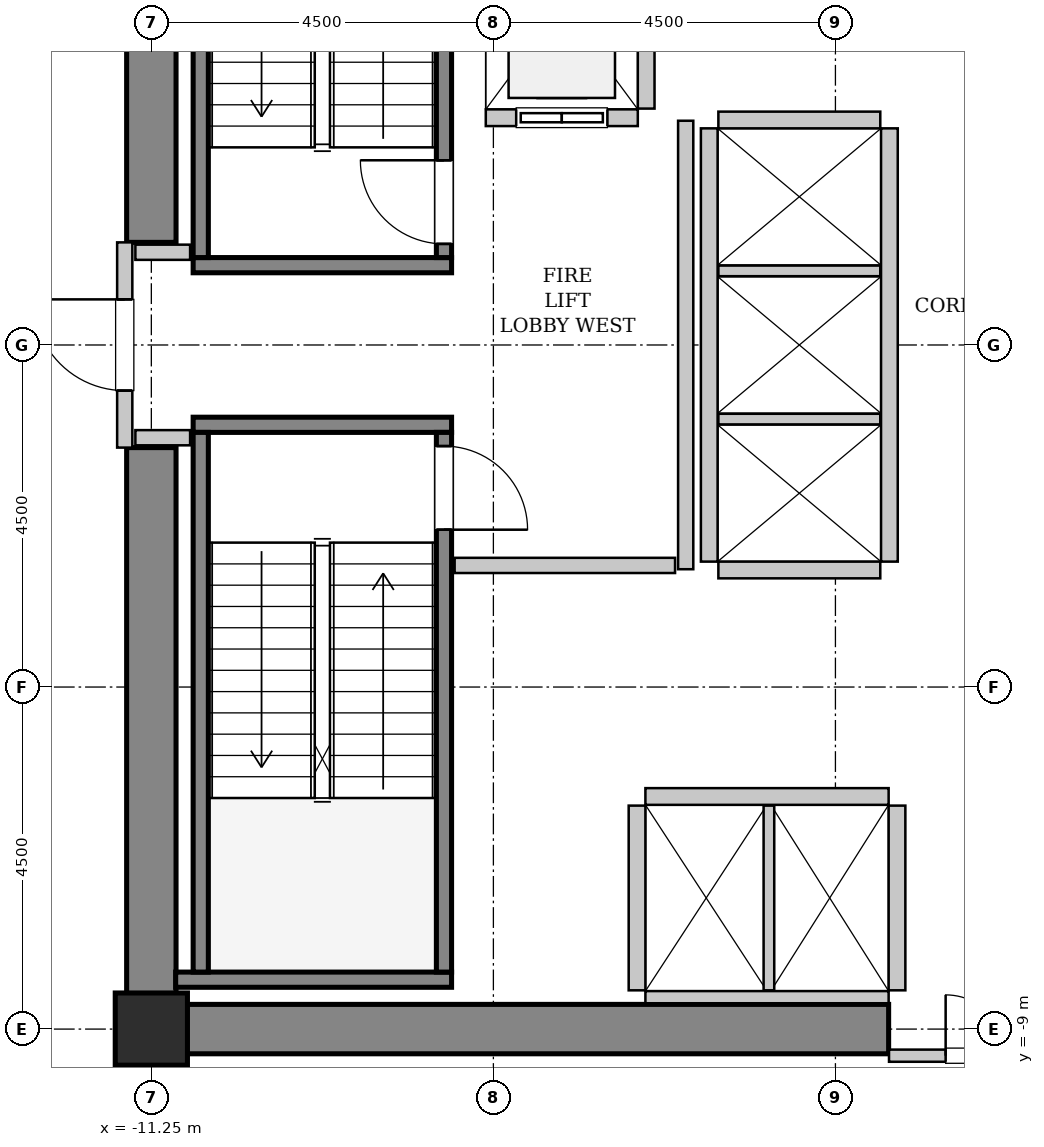
"""IFC4 building model, lengths in metres.
Left out: names, types, materials, properties, quantities, classifications, styles, units other than length and angle.
Written with IfcOpenShell. Run it as: python <this file> out.ifc"""

import sys

from ifc_helpers import new_model, si_unit, direction, frame, frame_2d, origin, origin_2d, place, context, subcontext, project, spatial, rectangle, hollow_rectangle, extrude, source, transform, mapped, element, fill, save


model = new_model("IFC4")
c1 = context("Model", 3, precision=1e-05, world=origin(), true_north=direction((0.0, 1.0)))
c2 = subcontext(c1, "Body", "Model", "MODEL_VIEW")
j1 = project(units=[si_unit("LENGTHUNIT", "METRE"), si_unit("PLANEANGLEUNIT", "RADIAN")], contexts=[c1])
p1 = place(None, origin())
s1 = spatial("IfcSite", under=j1, at=p1, CompositionType="ELEMENT")
p2 = place(p1, origin())
s2 = spatial("IfcBuilding", under=s1, at=p2, CompositionType="ELEMENT")
p3 = place(p2, frame((0.0, 0.0, 86.2)))
s3 = spatial("IfcBuildingStorey", under=s2, at=p3, CompositionType="ELEMENT", Elevation=86.2)
m1 = source(origin(), c2, "Body", "SweptSolid", [
    extrude(rectangle(XDim=10.025, YDim=0.65, at=frame_2d((5.012, 0.0))), origin(), (0.0, 0.0, 1.0), 4.6),
])
p4 = place(p3, frame((-11.575, -9.0, 0.0), z_axis=(0.0, 0.0, 1.0), x_axis=(1.0, 0.0, 0.0)))
e1 = element("IfcWall", 1, at=p4, inside=s3, PredefinedType="SHEAR", context=c2, shape_type="MappedRepresentation", body=[
    mapped(m1, transform((0.0, 0.0, 0.0), x_axis=(1.0, 0.0, 0.0), y_axis=(0.0, 1.0, 0.0), z_axis=(0.0, 0.0, 1.0), scale=1.0)),
])
m2 = source(origin(), c2, "Body", "SweptSolid", [
    extrude(rectangle(XDim=7.325, YDim=0.65, at=frame_2d((3.663, 0.0))), origin(), (0.0, 0.0, 1.0), 4.6),
])
for number, where, z_axis, x_axis in (
    (2, (-11.25, -8.675, 0.0), (0.0, 0.0, 1.0), (0.0, 1.0, 0.0)),
    (3, (-11.25, 1.35, 0.0), (0.0, 0.0, 1.0), (0.0, 1.0, 0.0)),
):
    element("IfcWall", number, at=place(p3, frame(where, z_axis=z_axis, x_axis=x_axis)), inside=s3, PredefinedType="SHEAR", context=c2, shape_type="MappedRepresentation", body=[
        mapped(m2, transform((0.0, 0.0, 0.0), x_axis=(1.0, 0.0, 0.0), y_axis=(0.0, 1.0, 0.0), z_axis=(0.0, 0.0, 1.0), scale=1.0)),
    ])
m3 = source(origin(), c2, "Body", "SweptSolid", [
    extrude(hollow_rectangle(XDim=0.95, YDim=0.95, WallThickness=0.045, InnerFilletRadius=0.045, OuterFilletRadius=0.09, at=origin_2d()), origin(), (0.0, 0.0, 1.0), 4.6),
])
p5 = place(p3, frame((-11.25, -9.0, 0.0), z_axis=(0.0, 0.0, 1.0), x_axis=(1.0, 0.0, 0.0)))
e4 = element("IfcColumn", 4, at=p5, inside=s3, PredefinedType="COLUMN", context=c2, shape_type="MappedRepresentation", body=[
    mapped(m3, transform((0.0, 0.0, 0.0), x_axis=(1.0, 0.0, 0.0), y_axis=(0.0, 1.0, 0.0), z_axis=(0.0, 0.0, 1.0), scale=1.0)),
])
m4 = source(origin(), c2, "Body", "SweptSolid", [
    extrude(rectangle(XDim=3.4, YDim=0.2, at=frame_2d((1.7, 0.0))), origin(), (0.0, 0.0, 1.0), 4.6),
])
p6 = place(p3, frame((-7.3, 1.05, 0.0), z_axis=(0.0, 0.0, 1.0), x_axis=(-1.0, 0.0, 0.0)))
e5 = element("IfcWall", 5, at=p6, inside=s3, PredefinedType="SOLIDWALL", context=c2, shape_type="MappedRepresentation", body=[
    mapped(m4, transform((0.0, 0.0, 0.0), x_axis=(1.0, 0.0, 0.0), y_axis=(0.0, 1.0, 0.0), z_axis=(0.0, 0.0, 1.0), scale=1.0)),
])
m5 = source(origin(), c2, "Body", "SweptSolid", [
    extrude(rectangle(XDim=7.1, YDim=0.2, at=frame_2d((3.55, 0.0))), origin(), (0.0, 0.0, 1.0), 4.6),
])
p7 = place(p3, frame((-7.4, 1.15, 0.0), z_axis=(0.0, 0.0, 1.0), x_axis=(0.0, 1.0, 0.0)))
e6 = element("IfcWall", 6, at=p7, inside=s3, PredefinedType="SOLIDWALL", context=c2, shape_type="MappedRepresentation", body=[
    mapped(m5, transform((0.0, 0.0, 0.0), x_axis=(1.0, 0.0, 0.0), y_axis=(0.0, 1.0, 0.0), z_axis=(0.0, 0.0, 1.0), scale=1.0)),
])
p8 = place(p7, frame((0.18, 0.0, 0.0)))
e7 = element("IfcOpeningElement", 7, at=p8, cuts=e6, PredefinedType="OPENING", context=c2, shape_type="SweptSolid", body=[
    extrude(rectangle(XDim=1.1, YDim=2.15, at=frame_2d((0.55, 1.075))), frame((0.0, 0.11, 0.0), z_axis=(0.0, -1.0, 0.0), x_axis=(1.0, 0.0, 0.0)), (0.0, 0.0, 1.0), 0.22),
])
p9 = place(p3, frame((-10.6, 1.15, 0.0), z_axis=(0.0, 0.0, 1.0), x_axis=(0.0, 1.0, 0.0)))
e8 = element("IfcWall", 8, at=p9, inside=s3, PredefinedType="SOLIDWALL", context=c2, shape_type="MappedRepresentation", body=[
    mapped(m5, transform((0.0, 0.0, 0.0), x_axis=(1.0, 0.0, 0.0), y_axis=(0.0, 1.0, 0.0), z_axis=(0.0, 0.0, 1.0), scale=1.0)),
])
p10 = place(p3, frame((-10.7, -1.05, 0.0), z_axis=(0.0, 0.0, 1.0), x_axis=(1.0, 0.0, 0.0)))
e9 = element("IfcWall", 9, at=p10, inside=s3, PredefinedType="SOLIDWALL", context=c2, shape_type="MappedRepresentation", body=[
    mapped(m4, transform((0.0, 0.0, 0.0), x_axis=(1.0, 0.0, 0.0), y_axis=(0.0, 1.0, 0.0), z_axis=(0.0, 0.0, 1.0), scale=1.0)),
])
m6 = source(origin(), c2, "Body", "SweptSolid", [
    extrude(rectangle(XDim=3.63, YDim=0.2, at=frame_2d((1.815, 0.0))), origin(), (0.0, 0.0, 1.0), 4.6),
])
p11 = place(p3, frame((-10.93, -8.35, 0.0), z_axis=(0.0, 0.0, 1.0), x_axis=(1.0, 0.0, 0.0)))
e10 = element("IfcWall", 10, at=p11, inside=s3, PredefinedType="SOLIDWALL", context=c2, shape_type="MappedRepresentation", body=[
    mapped(m6, transform((0.0, 0.0, 0.0), x_axis=(1.0, 0.0, 0.0), y_axis=(0.0, 1.0, 0.0), z_axis=(0.0, 0.0, 1.0), scale=1.0)),
])
p12 = place(p3, frame((-10.6, -1.15, 0.0), z_axis=(0.0, 0.0, 1.0), x_axis=(0.0, -1.0, 0.0)))
e11 = element("IfcWall", 11, at=p12, inside=s3, PredefinedType="SOLIDWALL", context=c2, shape_type="MappedRepresentation", body=[
    mapped(m5, transform((0.0, 0.0, 0.0), x_axis=(1.0, 0.0, 0.0), y_axis=(0.0, 1.0, 0.0), z_axis=(0.0, 0.0, 1.0), scale=1.0)),
])
p13 = place(p3, frame((-7.4, -1.15, 0.0), z_axis=(0.0, 0.0, 1.0), x_axis=(0.0, -1.0, 0.0)))
e12 = element("IfcWall", 12, at=p13, inside=s3, PredefinedType="SOLIDWALL", context=c2, shape_type="MappedRepresentation", body=[
    mapped(m5, transform((0.0, 0.0, 0.0), x_axis=(1.0, 0.0, 0.0), y_axis=(0.0, 1.0, 0.0), z_axis=(0.0, 0.0, 1.0), scale=1.0)),
])
p14 = place(p13, frame((0.18, 0.0, 0.0)))
e13 = element("IfcOpeningElement", 13, at=p14, cuts=e12, PredefinedType="OPENING", context=c2, shape_type="SweptSolid", body=[
    extrude(rectangle(XDim=1.1, YDim=2.15, at=frame_2d((0.55, 1.075))), frame((0.0, 0.11, 0.0), z_axis=(0.0, -1.0, 0.0), x_axis=(1.0, 0.0, 0.0)), (0.0, 0.0, 1.0), 0.22),
])
m7 = source(origin(), c2, "Body", "SweptSolid", [
    extrude(rectangle(XDim=2.0, YDim=0.22, at=frame_2d((1.0, 0.0))), origin(), (0.0, 0.0, 1.0), 4.335),
])
p15 = place(p3, frame((-6.85, 2.99, 0.0), z_axis=(0.0, 0.0, 1.0), x_axis=(1.0, 0.0, 0.0)))
e14 = element("IfcWall", 14, at=p15, inside=s3, PredefinedType="SOLIDWALL", context=c2, shape_type="MappedRepresentation", body=[
    mapped(m7, transform((0.0, 0.0, 0.0), x_axis=(1.0, 0.0, 0.0), y_axis=(0.0, 1.0, 0.0), z_axis=(0.0, 0.0, 1.0), scale=1.0)),
])
p16 = place(p15, frame((0.4, 0.0, 0.0)))
e15 = element("IfcOpeningElement", 15, at=p16, cuts=e14, PredefinedType="OPENING", context=c2, shape_type="SweptSolid", body=[
    extrude(rectangle(XDim=1.2, YDim=2.2, at=frame_2d((0.6, 1.1))), frame((0.0, 0.12, 0.0), z_axis=(0.0, -1.0, 0.0), x_axis=(1.0, 0.0, 0.0)), (0.0, 0.0, 1.0), 0.24),
])
m8 = source(origin(), c2, "Body", "SweptSolid", [
    extrude(rectangle(XDim=2.68, YDim=0.22, at=frame_2d((1.34, 0.0))), origin(), (0.0, 0.0, 1.0), 4.335),
])
p17 = place(p3, frame((-4.74, 3.11, 0.0), z_axis=(0.0, 0.0, 1.0), x_axis=(0.0, 1.0, 0.0)))
e16 = element("IfcWall", 16, at=p17, inside=s3, PredefinedType="SOLIDWALL", context=c2, shape_type="MappedRepresentation", body=[
    mapped(m8, transform((0.0, 0.0, 0.0), x_axis=(1.0, 0.0, 0.0), y_axis=(0.0, 1.0, 0.0), z_axis=(0.0, 0.0, 1.0), scale=1.0)),
])
m9 = source(origin(), c2, "Body", "SweptSolid", [
    extrude(rectangle(XDim=3.2, YDim=0.22, at=frame_2d((1.6, 0.0))), origin(), (0.0, 0.0, 1.0), 4.335),
])
p18 = place(p3, frame((-1.55, -5.94, 0.0), z_axis=(0.0, 0.0, 1.0), x_axis=(-1.0, 0.0, 0.0)))
e17 = element("IfcWall", 17, at=p18, inside=s3, PredefinedType="SOLIDWALL", context=c2, shape_type="MappedRepresentation", body=[
    mapped(m9, transform((0.0, 0.0, 0.0), x_axis=(1.0, 0.0, 0.0), y_axis=(0.0, 1.0, 0.0), z_axis=(0.0, 0.0, 1.0), scale=1.0)),
])
m10 = source(origin(), c2, "Body", "SweptSolid", [
    extrude(rectangle(XDim=3.2, YDim=0.16, at=frame_2d((1.6, 0.0))), origin(), (0.0, 0.0, 1.0), 3.225),
])
p19 = place(p3, frame((-4.75, -8.58, 0.0), z_axis=(0.0, 0.0, 1.0), x_axis=(1.0, 0.0, 0.0)))
e18 = element("IfcWall", 18, at=p19, inside=s3, PredefinedType="PARTITIONING", context=c2, shape_type="MappedRepresentation", body=[
    mapped(m10, transform((0.0, 0.0, 0.0), x_axis=(1.0, 0.0, 0.0), y_axis=(0.0, 1.0, 0.0), z_axis=(0.0, 0.0, 1.0), scale=1.0)),
])
m11 = source(origin(), c2, "Body", "SweptSolid", [
    extrude(rectangle(XDim=2.43, YDim=0.22, at=frame_2d((1.215, 0.0))), origin(), (0.0, 0.0, 1.0), 4.335),
])
p20 = place(p3, frame((-4.86, -6.06, 0.0), z_axis=(0.0, 0.0, 1.0), x_axis=(0.0, -1.0, 0.0)))
e19 = element("IfcWall", 19, at=p20, inside=s3, PredefinedType="SOLIDWALL", context=c2, shape_type="MappedRepresentation", body=[
    mapped(m11, transform((0.0, 0.0, 0.0), x_axis=(1.0, 0.0, 0.0), y_axis=(0.0, 1.0, 0.0), z_axis=(0.0, 0.0, 1.0), scale=1.0)),
])
m12 = source(origin(), c2, "Body", "SweptSolid", [
    extrude(rectangle(XDim=2.43, YDim=0.14, at=frame_2d((1.215, 0.0))), origin(), (0.0, 0.0, 1.0), 4.335),
])
p21 = place(p3, frame((-3.125, -8.49, 0.0), z_axis=(0.0, 0.0, 1.0), x_axis=(0.0, 1.0, 0.0)))
e20 = element("IfcWall", 20, at=p21, inside=s3, PredefinedType="PARTITIONING", context=c2, shape_type="MappedRepresentation", body=[
    mapped(m12, transform((0.0, 0.0, 0.0), x_axis=(1.0, 0.0, 0.0), y_axis=(0.0, 1.0, 0.0), z_axis=(0.0, 0.0, 1.0), scale=1.0)),
])
p22 = place(p3, frame((-1.44, -8.49, 0.0), z_axis=(0.0, 0.0, 1.0), x_axis=(0.0, 1.0, 0.0)))
e21 = element("IfcWall", 21, at=p22, inside=s3, PredefinedType="SOLIDWALL", context=c2, shape_type="MappedRepresentation", body=[
    mapped(m11, transform((0.0, 0.0, 0.0), x_axis=(1.0, 0.0, 0.0), y_axis=(0.0, 1.0, 0.0), z_axis=(0.0, 0.0, 1.0), scale=1.0)),
])
m13 = source(origin(), c2, "Body", "SweptSolid", [
    extrude(rectangle(XDim=5.7, YDim=0.22, at=frame_2d((2.85, 0.0))), origin(), (0.0, 0.0, 1.0), 4.335),
])
for number, where, z_axis, x_axis in (
    (22, (-1.54, -2.85, 0.0), (0.0, 0.0, 1.0), (0.0, 1.0, 0.0)),
    (23, (-3.91, 2.85, 0.0), (0.0, 0.0, 1.0), (0.0, -1.0, 0.0)),
):
    element("IfcWall", number, at=place(p3, frame(where, z_axis=z_axis, x_axis=x_axis)), inside=s3, PredefinedType="SOLIDWALL", context=c2, shape_type="MappedRepresentation", body=[
        mapped(m13, transform((0.0, 0.0, 0.0), x_axis=(1.0, 0.0, 0.0), y_axis=(0.0, 1.0, 0.0), z_axis=(0.0, 0.0, 1.0), scale=1.0)),
    ])
m14 = source(origin(), c2, "Body", "SweptSolid", [
    extrude(rectangle(XDim=2.13, YDim=0.22, at=frame_2d((1.065, 0.0))), origin(), (0.0, 0.0, 1.0), 4.335),
])
p23 = place(p3, frame((-3.79, -2.96, 0.0), z_axis=(0.0, 0.0, 1.0), x_axis=(1.0, 0.0, 0.0)))
e24 = element("IfcWall", 24, at=p23, inside=s3, PredefinedType="SOLIDWALL", context=c2, shape_type="MappedRepresentation", body=[
    mapped(m14, transform((0.0, 0.0, 0.0), x_axis=(1.0, 0.0, 0.0), y_axis=(0.0, 1.0, 0.0), z_axis=(0.0, 0.0, 1.0), scale=1.0)),
])
m15 = source(origin(), c2, "Body", "SweptSolid", [
    extrude(rectangle(XDim=2.13, YDim=0.14, at=frame_2d((1.065, 0.0))), origin(), (0.0, 0.0, 1.0), 4.335),
])
for number, where, z_axis, x_axis in (
    (25, (-3.79, -0.975, 0.0), (0.0, 0.0, 1.0), (1.0, 0.0, 0.0)),
    (26, (-3.79, 0.975, 0.0), (0.0, 0.0, 1.0), (1.0, 0.0, 0.0)),
):
    element("IfcWall", number, at=place(p3, frame(where, z_axis=z_axis, x_axis=x_axis)), inside=s3, PredefinedType="PARTITIONING", context=c2, shape_type="MappedRepresentation", body=[
        mapped(m15, transform((0.0, 0.0, 0.0), x_axis=(1.0, 0.0, 0.0), y_axis=(0.0, 1.0, 0.0), z_axis=(0.0, 0.0, 1.0), scale=1.0)),
    ])
p24 = place(p3, frame((-1.66, 2.96, 0.0), z_axis=(0.0, 0.0, 1.0), x_axis=(-1.0, 0.0, 0.0)))
e27 = element("IfcWall", 27, at=p24, inside=s3, PredefinedType="SOLIDWALL", context=c2, shape_type="MappedRepresentation", body=[
    mapped(m14, transform((0.0, 0.0, 0.0), x_axis=(1.0, 0.0, 0.0), y_axis=(0.0, 1.0, 0.0), z_axis=(0.0, 0.0, 1.0), scale=1.0)),
])
m16 = source(origin(), c2, "Body", "SweptSolid", [
    extrude(rectangle(XDim=2.7, YDim=0.2, at=frame_2d((1.35, 0.0))), origin(), (0.0, 0.0, 1.0), 3.225),
])
p25 = place(p3, frame((-11.6, -1.35, 0.0), z_axis=(0.0, 0.0, 1.0), x_axis=(0.0, 1.0, 0.0)))
e28 = element("IfcWall", 28, at=p25, inside=s3, PredefinedType="PARTITIONING", context=c2, shape_type="MappedRepresentation", body=[
    mapped(m16, transform((0.0, 0.0, 0.0), x_axis=(1.0, 0.0, 0.0), y_axis=(0.0, 1.0, 0.0), z_axis=(0.0, 0.0, 1.0), scale=1.0)),
])
p26 = place(p25, frame((0.75, 0.0, 0.0)))
e29 = element("IfcOpeningElement", 29, at=p26, cuts=e28, PredefinedType="OPENING", context=c2, shape_type="SweptSolid", body=[
    extrude(rectangle(XDim=1.2, YDim=2.15, at=frame_2d((0.6, 1.075))), frame((0.0, 0.11, 0.0), z_axis=(0.0, -1.0, 0.0), x_axis=(1.0, 0.0, 0.0)), (0.0, 0.0, 1.0), 0.22),
])
m17 = source(origin(), c2, "Body", "SweptSolid", [
    extrude(rectangle(XDim=5.9, YDim=0.2, at=frame_2d((2.95, 0.0))), origin(), (0.0, 0.0, 1.0), 4.335),
])
p27 = place(p3, frame((-4.22, -2.95, 0.0), z_axis=(0.0, 0.0, 1.0), x_axis=(0.0, 1.0, 0.0)))
e30 = element("IfcWall", 30, at=p27, inside=s3, PredefinedType="PARTITIONING", context=c2, shape_type="MappedRepresentation", body=[
    mapped(m17, transform((0.0, 0.0, 0.0), x_axis=(1.0, 0.0, 0.0), y_axis=(0.0, 1.0, 0.0), z_axis=(0.0, 0.0, 1.0), scale=1.0)),
])
m18 = source(origin(), c2, "Body", "SweptSolid", [
    extrude(rectangle(XDim=2.9, YDim=0.2, at=frame_2d((1.45, 0.0))), origin(), (0.0, 0.0, 1.0), 4.335),
])
p28 = place(p3, frame((-7.26, -2.9, 0.0), z_axis=(0.0, 0.0, 1.0), x_axis=(1.0, 0.0, 0.0)))
e31 = element("IfcWall", 31, at=p28, inside=s3, PredefinedType="PARTITIONING", context=c2, shape_type="MappedRepresentation", body=[
    mapped(m18, transform((0.0, 0.0, 0.0), x_axis=(1.0, 0.0, 0.0), y_axis=(0.0, 1.0, 0.0), z_axis=(0.0, 0.0, 1.0), scale=1.0)),
])
m19 = source(origin(), c2, "Body", "SweptSolid", [
    extrude(rectangle(XDim=0.72, YDim=0.2, at=frame_2d((0.36, 0.0))), origin(), (0.0, 0.0, 1.0), 4.335),
])
for number, where, z_axis, x_axis in (
    (32, (-11.46, 1.22, 0.0), (0.0, 0.0, 1.0), (1.0, 0.0, 0.0)),
    (33, (-11.46, -1.22, 0.0), (0.0, 0.0, 1.0), (1.0, 0.0, 0.0)),
):
    element("IfcWall", number, at=place(p3, frame(where, z_axis=z_axis, x_axis=x_axis)), inside=s3, PredefinedType="PARTITIONING", context=c2, shape_type="MappedRepresentation", body=[
        mapped(m19, transform((0.0, 0.0, 0.0), x_axis=(1.0, 0.0, 0.0), y_axis=(0.0, 1.0, 0.0), z_axis=(0.0, 0.0, 1.0), scale=1.0)),
    ])
m20 = source(origin(), c2, "Body", "SweptSolid", [
    extrude(rectangle(XDim=3.09, YDim=0.16, at=frame_2d((1.545, 0.0))), origin(), (0.0, 0.0, 1.0), 3.225),
])
p29 = place(p3, frame((-1.545, -9.35, 0.0), z_axis=(0.0, 0.0, 1.0), x_axis=(1.0, 0.0, 0.0)))
e34 = element("IfcWall", 34, at=p29, inside=s3, PredefinedType="PARTITIONING", context=c2, shape_type="MappedRepresentation", body=[
    mapped(m20, transform((0.0, 0.0, 0.0), x_axis=(1.0, 0.0, 0.0), y_axis=(0.0, 1.0, 0.0), z_axis=(0.0, 0.0, 1.0), scale=1.0)),
])
p30 = place(p29, frame((0.745, 0.0, 0.0)))
e35 = element("IfcOpeningElement", 35, at=p30, cuts=e34, PredefinedType="OPENING", context=c2, shape_type="SweptSolid", body=[
    extrude(rectangle(XDim=1.6, YDim=2.3, at=frame_2d((0.8, 1.15))), frame((0.0, 0.09, 0.0), z_axis=(0.0, -1.0, 0.0), x_axis=(1.0, 0.0, 0.0)), (0.0, 0.0, 1.0), 0.18),
])
m21 = source(origin(), c2, "Body", "SweptSolid", [
    extrude(rectangle(XDim=1.1, YDim=2.15, at=frame_2d((0.55, 1.075))), frame((0.0, 0.025, 0.0), z_axis=(0.0, -1.0, 0.0), x_axis=(1.0, 0.0, 0.0)), (0.0, 0.0, 1.0), 0.05),
])
p31 = place(p8, origin())
e36 = element("IfcDoor", 36, at=p31, inside=s3, OperationType="SINGLE_SWING_RIGHT", PredefinedType="DOOR", context=c2, shape_type="MappedRepresentation", body=[
    mapped(m21, transform((0.0, 0.0, 0.0), x_axis=(1.0, 0.0, 0.0), y_axis=(0.0, 1.0, 0.0), z_axis=(0.0, 0.0, 1.0), scale=1.0)),
])
fill(e7, e36)
p32 = place(p14, origin())
e37 = element("IfcDoor", 37, at=p32, inside=s3, OperationType="SINGLE_SWING_RIGHT", PredefinedType="DOOR", context=c2, shape_type="MappedRepresentation", body=[
    mapped(m21, transform((0.0, 0.0, 0.0), x_axis=(1.0, 0.0, 0.0), y_axis=(0.0, 1.0, 0.0), z_axis=(0.0, 0.0, 1.0), scale=1.0)),
])
fill(e13, e37)
m22 = source(origin(), c2, "Body", "SweptSolid", [
    extrude(rectangle(XDim=1.2, YDim=2.2, at=frame_2d((0.6, 1.1))), frame((0.0, 0.025, 0.0), z_axis=(0.0, -1.0, 0.0), x_axis=(1.0, 0.0, 0.0)), (0.0, 0.0, 1.0), 0.05),
])
p33 = place(p16, origin())
e38 = element("IfcDoor", 38, at=p33, inside=s3, OperationType="SLIDING_TO_LEFT", PredefinedType="DOOR", context=c2, shape_type="MappedRepresentation", body=[
    mapped(m22, transform((0.0, 0.0, 0.0), x_axis=(1.0, 0.0, 0.0), y_axis=(0.0, 1.0, 0.0), z_axis=(0.0, 0.0, 1.0), scale=1.0)),
])
fill(e15, e38)
m23 = source(origin(), c2, "Body", "SweptSolid", [
    extrude(rectangle(XDim=1.2, YDim=2.15, at=frame_2d((0.6, 1.075))), frame((0.0, 0.025, 0.0), z_axis=(0.0, -1.0, 0.0), x_axis=(1.0, 0.0, 0.0)), (0.0, 0.0, 1.0), 0.05),
])
p34 = place(p26, origin())
e39 = element("IfcDoor", 39, at=p34, inside=s3, OperationType="SINGLE_SWING_RIGHT", PredefinedType="DOOR", context=c2, shape_type="MappedRepresentation", body=[
    mapped(m23, transform((0.0, 0.0, 0.0), x_axis=(1.0, 0.0, 0.0), y_axis=(0.0, 1.0, 0.0), z_axis=(0.0, 0.0, 1.0), scale=1.0)),
])
fill(e29, e39)
m24 = source(origin(), c2, "Body", "SweptSolid", [
    extrude(rectangle(XDim=1.6, YDim=2.3, at=frame_2d((0.8, 1.15))), frame((0.0, 0.025, 0.0), z_axis=(0.0, -1.0, 0.0), x_axis=(1.0, 0.0, 0.0)), (0.0, 0.0, 1.0), 0.05),
])
p35 = place(p30, origin())
e40 = element("IfcDoor", 40, at=p35, inside=s3, OperationType="DOUBLE_DOOR_SINGLE_SWING", PredefinedType="DOOR", context=c2, shape_type="MappedRepresentation", body=[
    mapped(m24, transform((0.0, 0.0, 0.0), x_axis=(1.0, 0.0, 0.0), y_axis=(0.0, 1.0, 0.0), z_axis=(0.0, 0.0, 1.0), scale=1.0)),
])
fill(e35, e40)
save(model, sys.argv[1])
